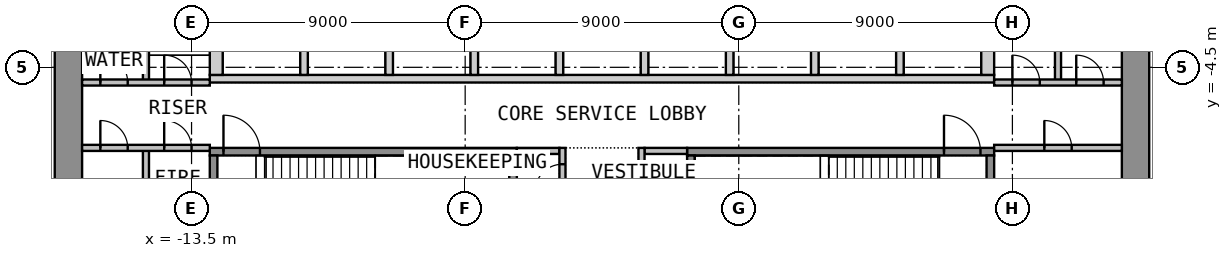
"""IFC4 building model, lengths in metres.
Left out: names, types, materials, properties, quantities, classifications, styles, units other than length and angle.
Written with IfcOpenShell. Run it as: python <this file> out.ifc"""

import sys

from ifc_helpers import new_model, si_unit, direction, frame, frame_2d, origin, place, context, subcontext, project, spatial, polyline, rectangle, outline, extrude, element, fill, save


model = new_model("IFC4")
c1 = context("Model", 3, precision=1e-05, world=origin(), true_north=direction((0.0, 1.0)))
c2 = subcontext(c1, "Body", "Model", "MODEL_VIEW")
j1 = project(units=[si_unit("LENGTHUNIT", "METRE"), si_unit("PLANEANGLEUNIT", "RADIAN")], contexts=[c1])
p1 = place(None, origin())
s1 = spatial("IfcSite", under=j1, at=p1, CompositionType="ELEMENT")
p2 = place(p1, origin())
s2 = spatial("IfcBuilding", under=s1, at=p2, CompositionType="ELEMENT")
p3 = place(p2, frame((0.0, 0.0, 6.0)))
s3 = spatial("IfcBuildingStorey", under=s2, at=p3, CompositionType="ELEMENT", Elevation=6.0)
p4 = place(p3, frame((-17.55, -12.6, 0.0), z_axis=(0.0, 0.0, 1.0), x_axis=(0.0, 1.0, 0.0)))
e1 = element("IfcWall", 1, at=p4, inside=s3, PredefinedType="SHEAR", context=c2, shape_type="SweptSolid", body=[
    extrude(rectangle(XDim=25.2, YDim=0.9, at=frame_2d((12.6, 0.0))), origin(), (0.0, 0.0, 1.0), 4.4),
])
p5 = place(p4, frame((11.4, 0.0, 0.0)))
e2 = element("IfcOpeningElement", 2, at=p5, cuts=e1, PredefinedType="OPENING", context=c2, shape_type="SweptSolid", body=[
    extrude(rectangle(XDim=2.4, YDim=2.1, at=frame_2d((1.2, 1.05))), frame((0.0, 0.46, 0.0), z_axis=(0.0, -1.0, 0.0), x_axis=(1.0, 0.0, 0.0)), (0.0, 0.0, 1.0), 0.92),
])
p6 = place(p3, frame((17.55, -12.6, 0.0), z_axis=(0.0, 0.0, 1.0), x_axis=(0.0, 1.0, 0.0)))
e3 = element("IfcWall", 3, at=p6, inside=s3, PredefinedType="SHEAR", context=c2, shape_type="SweptSolid", body=[
    extrude(rectangle(XDim=25.2, YDim=0.9, at=frame_2d((12.6, 0.0))), origin(), (0.0, 0.0, 1.0), 4.4),
])
p7 = place(p6, frame((11.4, 0.0, 0.0)))
e4 = element("IfcOpeningElement", 4, at=p7, cuts=e3, PredefinedType="OPENING", context=c2, shape_type="SweptSolid", body=[
    extrude(rectangle(XDim=2.4, YDim=2.1, at=frame_2d((1.2, 1.05))), frame((0.0, 0.46, 0.0), z_axis=(0.0, -1.0, 0.0), x_axis=(1.0, 0.0, 0.0)), (0.0, 0.0, 1.0), 0.92),
])
p8 = place(p3, origin())
e5 = element("IfcWall", 5, at=p8, inside=s3, PredefinedType="SHEAR", context=c2, shape_type="SweptSolid", body=[
    extrude(outline(polyline([(-12.9, -5.0), (12.9, -5.0), (12.9, -4.75), (-12.9, -4.75), (-12.9, -5.0)])), origin(), (0.0, 0.0, 1.0), 4.4),
])
p9 = place(p3, origin())
e6 = element("IfcWall", 6, at=p9, inside=s3, PredefinedType="SHEAR", context=c2, shape_type="SweptSolid", body=[
    extrude(outline(polyline([(-12.9, -4.75), (-12.475, -4.75), (-12.475, -2.05), (-12.9, -2.05), (-12.9, -4.75)])), origin(), (0.0, 0.0, 1.0), 4.4),
])
p10 = place(p3, origin())
e7 = element("IfcWall", 7, at=p10, inside=s3, PredefinedType="SHEAR", context=c2, shape_type="SweptSolid", body=[
    extrude(outline(polyline([(-9.925, -4.75), (-9.675, -4.75), (-9.675, -2.05), (-9.925, -2.05), (-9.925, -4.75)])), origin(), (0.0, 0.0, 1.0), 4.4),
])
p11 = place(p3, origin())
e8 = element("IfcWall", 8, at=p11, inside=s3, PredefinedType="SHEAR", context=c2, shape_type="SweptSolid", body=[
    extrude(outline(polyline([(-7.125, -4.75), (-6.875, -4.75), (-6.875, -2.05), (-7.125, -2.05), (-7.125, -4.75)])), origin(), (0.0, 0.0, 1.0), 4.4),
])
p12 = place(p3, origin())
e9 = element("IfcWall", 9, at=p12, inside=s3, PredefinedType="SHEAR", context=c2, shape_type="SweptSolid", body=[
    extrude(outline(polyline([(-4.325, -4.75), (-4.075, -4.75), (-4.075, -2.05), (-4.325, -2.05), (-4.325, -4.75)])), origin(), (0.0, 0.0, 1.0), 4.4),
])
p13 = place(p3, origin())
e10 = element("IfcWall", 10, at=p13, inside=s3, PredefinedType="SHEAR", context=c2, shape_type="SweptSolid", body=[
    extrude(outline(polyline([(-1.525, -4.75), (-1.275, -4.75), (-1.275, -2.05), (-1.525, -2.05), (-1.525, -4.75)])), origin(), (0.0, 0.0, 1.0), 4.4),
])
p14 = place(p3, origin())
e11 = element("IfcWall", 11, at=p14, inside=s3, PredefinedType="SHEAR", context=c2, shape_type="SweptSolid", body=[
    extrude(outline(polyline([(1.275, -4.75), (1.525, -4.75), (1.525, -2.05), (1.275, -2.05), (1.275, -4.75)])), origin(), (0.0, 0.0, 1.0), 4.4),
])
p15 = place(p3, origin())
e12 = element("IfcWall", 12, at=p15, inside=s3, PredefinedType="SHEAR", context=c2, shape_type="SweptSolid", body=[
    extrude(outline(polyline([(4.075, -4.75), (4.325, -4.75), (4.325, -2.05), (4.075, -2.05), (4.075, -4.75)])), origin(), (0.0, 0.0, 1.0), 4.4),
])
p16 = place(p3, origin())
e13 = element("IfcWall", 13, at=p16, inside=s3, PredefinedType="SHEAR", context=c2, shape_type="SweptSolid", body=[
    extrude(outline(polyline([(6.875, -4.75), (7.125, -4.75), (7.125, -2.05), (6.875, -2.05), (6.875, -4.75)])), origin(), (0.0, 0.0, 1.0), 4.4),
])
p17 = place(p3, origin())
e14 = element("IfcWall", 14, at=p17, inside=s3, PredefinedType="SHEAR", context=c2, shape_type="SweptSolid", body=[
    extrude(outline(polyline([(9.675, -4.75), (9.925, -4.75), (9.925, -2.05), (9.675, -2.05), (9.675, -4.75)])), origin(), (0.0, 0.0, 1.0), 4.4),
])
p18 = place(p3, origin())
e15 = element("IfcWall", 15, at=p18, inside=s3, PredefinedType="SHEAR", context=c2, shape_type="SweptSolid", body=[
    extrude(outline(polyline([(12.475, -4.75), (12.9, -4.75), (12.9, -2.05), (12.475, -2.05), (12.475, -4.75)])), origin(), (0.0, 0.0, 1.0), 4.4),
])
p19 = place(p3, frame((-12.9, -7.275, 0.0), z_axis=(0.0, 0.0, 1.0), x_axis=(1.0, 0.0, 0.0)))
e16 = element("IfcWall", 16, at=p19, inside=s3, PredefinedType="SHEAR", context=c2, shape_type="SweptSolid", body=[
    extrude(rectangle(XDim=10.1, YDim=0.25, at=frame_2d((5.05, 0.0))), origin(), (0.0, 0.0, 1.0), 4.4),
])
p20 = place(p19, frame((0.45, 0.0, 0.0)))
e17 = element("IfcOpeningElement", 17, at=p20, cuts=e16, PredefinedType="OPENING", context=c2, shape_type="SweptSolid", body=[
    extrude(rectangle(XDim=1.2, YDim=2.1, at=frame_2d((0.6, 1.05))), frame((0.0, 0.135, 0.0), z_axis=(0.0, -1.0, 0.0), x_axis=(1.0, 0.0, 0.0)), (0.0, 0.0, 1.0), 0.27),
])
for number, where, z_axis, x_axis in (
    (18, (-12.775, -10.65, 0.0), (0.0, 0.0, 1.0), (0.0, 1.0, 0.0)),
    (19, (-2.925, -10.65, 0.0), (0.0, 0.0, 1.0), (0.0, 1.0, 0.0)),
):
    element("IfcWall", number, at=place(p3, frame(where, z_axis=z_axis, x_axis=x_axis)), inside=s3, PredefinedType="SHEAR", context=c2, shape_type="SweptSolid", body=[
        extrude(rectangle(XDim=3.25, YDim=0.25, at=frame_2d((1.625, 0.0))), origin(), (0.0, 0.0, 1.0), 4.4),
    ])
p21 = place(p3, frame((2.8, -7.275, 0.0), z_axis=(0.0, 0.0, 1.0), x_axis=(1.0, 0.0, 0.0)))
e20 = element("IfcWall", 20, at=p21, inside=s3, PredefinedType="SHEAR", context=c2, shape_type="SweptSolid", body=[
    extrude(rectangle(XDim=10.1, YDim=0.25, at=frame_2d((5.05, 0.0))), origin(), (0.0, 0.0, 1.0), 4.4),
])
p22 = place(p21, frame((8.45, 0.0, 0.0)))
e21 = element("IfcOpeningElement", 21, at=p22, cuts=e20, PredefinedType="OPENING", context=c2, shape_type="SweptSolid", body=[
    extrude(rectangle(XDim=1.2, YDim=2.1, at=frame_2d((0.6, 1.05))), frame((0.0, 0.135, 0.0), z_axis=(0.0, -1.0, 0.0), x_axis=(1.0, 0.0, 0.0)), (0.0, 0.0, 1.0), 0.27),
])
for number, where, z_axis, x_axis in (
    (22, (2.925, -10.65, 0.0), (0.0, 0.0, 1.0), (0.0, 1.0, 0.0)),
    (23, (12.775, -10.65, 0.0), (0.0, 0.0, 1.0), (0.0, 1.0, 0.0)),
):
    element("IfcWall", number, at=place(p3, frame(where, z_axis=z_axis, x_axis=x_axis)), inside=s3, PredefinedType="SHEAR", context=c2, shape_type="SweptSolid", body=[
        extrude(rectangle(XDim=3.25, YDim=0.25, at=frame_2d((1.625, 0.0))), origin(), (0.0, 0.0, 1.0), 4.4),
    ])
for number, where, z_axis, x_axis in (
    (24, (-2.8, -7.25, 0.0), (0.0, 0.0, 1.0), (1.0, 0.0, 0.0)),
    (25, (1.4, -7.25, 0.0), (0.0, 0.0, 1.0), (1.0, 0.0, 0.0)),
):
    element("IfcWall", number, at=place(p3, frame(where, z_axis=z_axis, x_axis=x_axis)), inside=s3, PredefinedType="PARTITIONING", context=c2, shape_type="SweptSolid", body=[
        extrude(rectangle(XDim=1.4, YDim=0.2, at=frame_2d((0.7, 0.0))), origin(), (0.0, 0.0, 1.0), 4.4),
    ])
p23 = place(p3, frame((-1.3, -12.6, 0.0), z_axis=(0.0, 0.0, 1.0), x_axis=(0.0, 1.0, 0.0)))
e26 = element("IfcWall", 26, at=p23, inside=s3, PredefinedType="PARTITIONING", context=c2, shape_type="SweptSolid", body=[
    extrude(rectangle(XDim=5.45, YDim=0.2, at=frame_2d((2.725, 0.0))), origin(), (0.0, 0.0, 1.0), 4.4),
])
p24 = place(p23, frame((1.387, 0.0, 0.0)))
e27 = element("IfcOpeningElement", 27, at=p24, cuts=e26, PredefinedType="OPENING", context=c2, shape_type="SweptSolid", body=[
    extrude(rectangle(XDim=0.9, YDim=2.1, at=frame_2d((0.45, 1.05))), frame((0.0, 0.11, 0.0), z_axis=(0.0, -1.0, 0.0), x_axis=(1.0, 0.0, 0.0)), (0.0, 0.0, 1.0), 0.22),
])
p25 = place(p23, frame((4.012, 0.0, 0.0)))
e28 = element("IfcOpeningElement", 28, at=p25, cuts=e26, PredefinedType="OPENING", context=c2, shape_type="SweptSolid", body=[
    extrude(rectangle(XDim=0.9, YDim=2.1, at=frame_2d((0.45, 1.05))), frame((0.0, 0.11, 0.0), z_axis=(0.0, -1.0, 0.0), x_axis=(1.0, 0.0, 0.0)), (0.0, 0.0, 1.0), 0.22),
])
p26 = place(p3, frame((1.3, -12.6, 0.0), z_axis=(0.0, 0.0, 1.0), x_axis=(0.0, 1.0, 0.0)))
e29 = element("IfcWall", 29, at=p26, inside=s3, PredefinedType="PARTITIONING", context=c2, shape_type="SweptSolid", body=[
    extrude(rectangle(XDim=5.45, YDim=0.2, at=frame_2d((2.725, 0.0))), origin(), (0.0, 0.0, 1.0), 4.4),
])
p27 = place(p26, frame((0.337, 0.0, 0.0)))
e30 = element("IfcOpeningElement", 30, at=p27, cuts=e29, PredefinedType="OPENING", context=c2, shape_type="SweptSolid", body=[
    extrude(rectangle(XDim=0.9, YDim=2.1, at=frame_2d((0.45, 1.05))), frame((0.0, 0.11, 0.0), z_axis=(0.0, -1.0, 0.0), x_axis=(1.0, 0.0, 0.0)), (0.0, 0.0, 1.0), 0.22),
])
p28 = place(p26, frame((2.962, 0.0, 0.0)))
e31 = element("IfcOpeningElement", 31, at=p28, cuts=e29, PredefinedType="OPENING", context=c2, shape_type="SweptSolid", body=[
    extrude(rectangle(XDim=0.9, YDim=2.1, at=frame_2d((0.45, 1.05))), frame((0.0, 0.11, 0.0), z_axis=(0.0, -1.0, 0.0), x_axis=(1.0, 0.0, 0.0)), (0.0, 0.0, 1.0), 0.22),
])
p29 = place(p3, frame((-15.0, -12.6, 0.0), z_axis=(0.0, 0.0, 1.0), x_axis=(0.0, 1.0, 0.0)))
e32 = element("IfcWall", 32, at=p29, inside=s3, PredefinedType="PARTITIONING", context=c2, shape_type="SweptSolid", body=[
    extrude(rectangle(XDim=5.45, YDim=0.2, at=frame_2d((2.725, 0.0))), origin(), (0.0, 0.0, 1.0), 4.4),
])
p30 = place(p3, frame((-17.1, -7.15, 0.0), z_axis=(0.0, 0.0, 1.0), x_axis=(1.0, 0.0, 0.0)))
e33 = element("IfcWall", 33, at=p30, inside=s3, PredefinedType="PARTITIONING", context=c2, shape_type="SweptSolid", body=[
    extrude(rectangle(XDim=4.2, YDim=0.2, at=frame_2d((2.1, 0.0))), origin(), (0.0, 0.0, 1.0), 4.4),
])
p31 = place(p30, frame((0.6, 0.0, 0.0)))
e34 = element("IfcOpeningElement", 34, at=p31, cuts=e33, PredefinedType="OPENING", context=c2, shape_type="SweptSolid", body=[
    extrude(rectangle(XDim=0.9, YDim=2.1, at=frame_2d((0.45, 1.05))), frame((0.0, 0.11, 0.0), z_axis=(0.0, -1.0, 0.0), x_axis=(1.0, 0.0, 0.0)), (0.0, 0.0, 1.0), 0.22),
])
p32 = place(p30, frame((2.7, 0.0, 0.0)))
e35 = element("IfcOpeningElement", 35, at=p32, cuts=e33, PredefinedType="OPENING", context=c2, shape_type="SweptSolid", body=[
    extrude(rectangle(XDim=0.9, YDim=2.1, at=frame_2d((0.45, 1.05))), frame((0.0, 0.11, 0.0), z_axis=(0.0, -1.0, 0.0), x_axis=(1.0, 0.0, 0.0)), (0.0, 0.0, 1.0), 0.22),
])
p33 = place(p3, frame((-15.0, -5.0, 0.0), z_axis=(0.0, 0.0, 1.0), x_axis=(0.0, 1.0, 0.0)))
e36 = element("IfcWall", 36, at=p33, inside=s3, PredefinedType="PARTITIONING", context=c2, shape_type="SweptSolid", body=[
    extrude(rectangle(XDim=3.2, YDim=0.2, at=frame_2d((1.6, 0.0))), origin(), (0.0, 0.0, 1.0), 4.4),
])
p34 = place(p3, frame((-17.1, -5.0, 0.0), z_axis=(0.0, 0.0, 1.0), x_axis=(1.0, 0.0, 0.0)))
e37 = element("IfcWall", 37, at=p34, inside=s3, PredefinedType="PARTITIONING", context=c2, shape_type="SweptSolid", body=[
    extrude(rectangle(XDim=4.2, YDim=0.2, at=frame_2d((2.1, 0.0))), origin(), (0.0, 0.0, 1.0), 4.4),
])
p35 = place(p34, frame((0.6, 0.0, 0.0)))
e38 = element("IfcOpeningElement", 38, at=p35, cuts=e37, PredefinedType="OPENING", context=c2, shape_type="SweptSolid", body=[
    extrude(rectangle(XDim=0.9, YDim=2.1, at=frame_2d((0.45, 1.05))), frame((0.0, 0.11, 0.0), z_axis=(0.0, -1.0, 0.0), x_axis=(1.0, 0.0, 0.0)), (0.0, 0.0, 1.0), 0.22),
])
p36 = place(p34, frame((2.7, 0.0, 0.0)))
e39 = element("IfcOpeningElement", 39, at=p36, cuts=e37, PredefinedType="OPENING", context=c2, shape_type="SweptSolid", body=[
    extrude(rectangle(XDim=0.9, YDim=2.1, at=frame_2d((0.45, 1.05))), frame((0.0, 0.11, 0.0), z_axis=(0.0, -1.0, 0.0), x_axis=(1.0, 0.0, 0.0)), (0.0, 0.0, 1.0), 0.22),
])
p37 = place(p3, frame((12.9, -7.15, 0.0), z_axis=(0.0, 0.0, 1.0), x_axis=(1.0, 0.0, 0.0)))
e40 = element("IfcWall", 40, at=p37, inside=s3, PredefinedType="PARTITIONING", context=c2, shape_type="SweptSolid", body=[
    extrude(rectangle(XDim=4.2, YDim=0.2, at=frame_2d((2.1, 0.0))), origin(), (0.0, 0.0, 1.0), 4.4),
])
p38 = place(p37, frame((1.65, 0.0, 0.0)))
e41 = element("IfcOpeningElement", 41, at=p38, cuts=e40, PredefinedType="OPENING", context=c2, shape_type="SweptSolid", body=[
    extrude(rectangle(XDim=0.9, YDim=2.1, at=frame_2d((0.45, 1.05))), frame((0.0, 0.11, 0.0), z_axis=(0.0, -1.0, 0.0), x_axis=(1.0, 0.0, 0.0)), (0.0, 0.0, 1.0), 0.22),
])
p39 = place(p3, frame((15.0, -5.0, 0.0), z_axis=(0.0, 0.0, 1.0), x_axis=(0.0, 1.0, 0.0)))
e42 = element("IfcWall", 42, at=p39, inside=s3, PredefinedType="PARTITIONING", context=c2, shape_type="SweptSolid", body=[
    extrude(rectangle(XDim=3.2, YDim=0.2, at=frame_2d((1.6, 0.0))), origin(), (0.0, 0.0, 1.0), 4.4),
])
p40 = place(p3, frame((12.9, -5.0, 0.0), z_axis=(0.0, 0.0, 1.0), x_axis=(1.0, 0.0, 0.0)))
e43 = element("IfcWall", 43, at=p40, inside=s3, PredefinedType="PARTITIONING", context=c2, shape_type="SweptSolid", body=[
    extrude(rectangle(XDim=4.2, YDim=0.2, at=frame_2d((2.1, 0.0))), origin(), (0.0, 0.0, 1.0), 4.4),
])
p41 = place(p40, frame((0.6, 0.0, 0.0)))
e44 = element("IfcOpeningElement", 44, at=p41, cuts=e43, PredefinedType="OPENING", context=c2, shape_type="SweptSolid", body=[
    extrude(rectangle(XDim=0.9, YDim=2.1, at=frame_2d((0.45, 1.05))), frame((0.0, 0.11, 0.0), z_axis=(0.0, -1.0, 0.0), x_axis=(1.0, 0.0, 0.0)), (0.0, 0.0, 1.0), 0.22),
])
p42 = place(p40, frame((2.7, 0.0, 0.0)))
e45 = element("IfcOpeningElement", 45, at=p42, cuts=e43, PredefinedType="OPENING", context=c2, shape_type="SweptSolid", body=[
    extrude(rectangle(XDim=0.9, YDim=2.1, at=frame_2d((0.45, 1.05))), frame((0.0, 0.11, 0.0), z_axis=(0.0, -1.0, 0.0), x_axis=(1.0, 0.0, 0.0)), (0.0, 0.0, 1.0), 0.22),
])
p43 = place(p20, origin())
e46 = element("IfcDoor", 46, at=p43, inside=s3, OperationType="SINGLE_SWING_LEFT", PredefinedType="DOOR", context=c2, shape_type="SweptSolid", body=[
    extrude(rectangle(XDim=1.2, YDim=2.1, at=frame_2d((0.6, 1.05))), frame((0.0, 0.025, 0.0), z_axis=(0.0, -1.0, 0.0), x_axis=(1.0, 0.0, 0.0)), (0.0, 0.0, 1.0), 0.05),
])
fill(e17, e46)
p44 = place(p22, origin())
e47 = element("IfcDoor", 47, at=p44, inside=s3, OperationType="SINGLE_SWING_LEFT", PredefinedType="DOOR", context=c2, shape_type="SweptSolid", body=[
    extrude(rectangle(XDim=1.2, YDim=2.1, at=frame_2d((0.6, 1.05))), frame((0.0, 0.025, 0.0), z_axis=(0.0, -1.0, 0.0), x_axis=(1.0, 0.0, 0.0)), (0.0, 0.0, 1.0), 0.05),
])
fill(e21, e47)
p45 = place(p25, origin())
e48 = element("IfcDoor", 48, at=p45, inside=s3, OperationType="SINGLE_SWING_LEFT", PredefinedType="DOOR", context=c2, shape_type="SweptSolid", body=[
    extrude(rectangle(XDim=0.9, YDim=2.1, at=frame_2d((0.45, 1.05))), frame((0.0, 0.025, 0.0), z_axis=(0.0, -1.0, 0.0), x_axis=(1.0, 0.0, 0.0)), (0.0, 0.0, 1.0), 0.05),
])
fill(e28, e48)
p46 = place(p31, origin())
e49 = element("IfcDoor", 49, at=p46, inside=s3, OperationType="SINGLE_SWING_LEFT", PredefinedType="DOOR", context=c2, shape_type="SweptSolid", body=[
    extrude(rectangle(XDim=0.9, YDim=2.1, at=frame_2d((0.45, 1.05))), frame((0.0, 0.025, 0.0), z_axis=(0.0, -1.0, 0.0), x_axis=(1.0, 0.0, 0.0)), (0.0, 0.0, 1.0), 0.05),
])
fill(e34, e49)
p47 = place(p32, origin())
e50 = element("IfcDoor", 50, at=p47, inside=s3, OperationType="SINGLE_SWING_LEFT", PredefinedType="DOOR", context=c2, shape_type="SweptSolid", body=[
    extrude(rectangle(XDim=0.9, YDim=2.1, at=frame_2d((0.45, 1.05))), frame((0.0, 0.025, 0.0), z_axis=(0.0, -1.0, 0.0), x_axis=(1.0, 0.0, 0.0)), (0.0, 0.0, 1.0), 0.05),
])
fill(e35, e50)
p48 = place(p35, origin())
e51 = element("IfcDoor", 51, at=p48, inside=s3, OperationType="SINGLE_SWING_LEFT", PredefinedType="DOOR", context=c2, shape_type="SweptSolid", body=[
    extrude(rectangle(XDim=0.9, YDim=2.1, at=frame_2d((0.45, 1.05))), frame((0.0, 0.025, 0.0), z_axis=(0.0, -1.0, 0.0), x_axis=(1.0, 0.0, 0.0)), (0.0, 0.0, 1.0), 0.05),
])
fill(e38, e51)
p49 = place(p36, origin())
e52 = element("IfcDoor", 52, at=p49, inside=s3, OperationType="SINGLE_SWING_LEFT", PredefinedType="DOOR", context=c2, shape_type="SweptSolid", body=[
    extrude(rectangle(XDim=0.9, YDim=2.1, at=frame_2d((0.45, 1.05))), frame((0.0, 0.025, 0.0), z_axis=(0.0, -1.0, 0.0), x_axis=(1.0, 0.0, 0.0)), (0.0, 0.0, 1.0), 0.05),
])
fill(e39, e52)
p50 = place(p38, origin())
e53 = element("IfcDoor", 53, at=p50, inside=s3, OperationType="SINGLE_SWING_LEFT", PredefinedType="DOOR", context=c2, shape_type="SweptSolid", body=[
    extrude(rectangle(XDim=0.9, YDim=2.1, at=frame_2d((0.45, 1.05))), frame((0.0, 0.025, 0.0), z_axis=(0.0, -1.0, 0.0), x_axis=(1.0, 0.0, 0.0)), (0.0, 0.0, 1.0), 0.05),
])
fill(e41, e53)
p51 = place(p41, origin())
e54 = element("IfcDoor", 54, at=p51, inside=s3, OperationType="SINGLE_SWING_LEFT", PredefinedType="DOOR", context=c2, shape_type="SweptSolid", body=[
    extrude(rectangle(XDim=0.9, YDim=2.1, at=frame_2d((0.45, 1.05))), frame((0.0, 0.025, 0.0), z_axis=(0.0, -1.0, 0.0), x_axis=(1.0, 0.0, 0.0)), (0.0, 0.0, 1.0), 0.05),
])
fill(e44, e54)
p52 = place(p42, origin())
e55 = element("IfcDoor", 55, at=p52, inside=s3, OperationType="SINGLE_SWING_LEFT", PredefinedType="DOOR", context=c2, shape_type="SweptSolid", body=[
    extrude(rectangle(XDim=0.9, YDim=2.1, at=frame_2d((0.45, 1.05))), frame((0.0, 0.025, 0.0), z_axis=(0.0, -1.0, 0.0), x_axis=(1.0, 0.0, 0.0)), (0.0, 0.0, 1.0), 0.05),
])
fill(e45, e55)
save(model, sys.argv[1])
